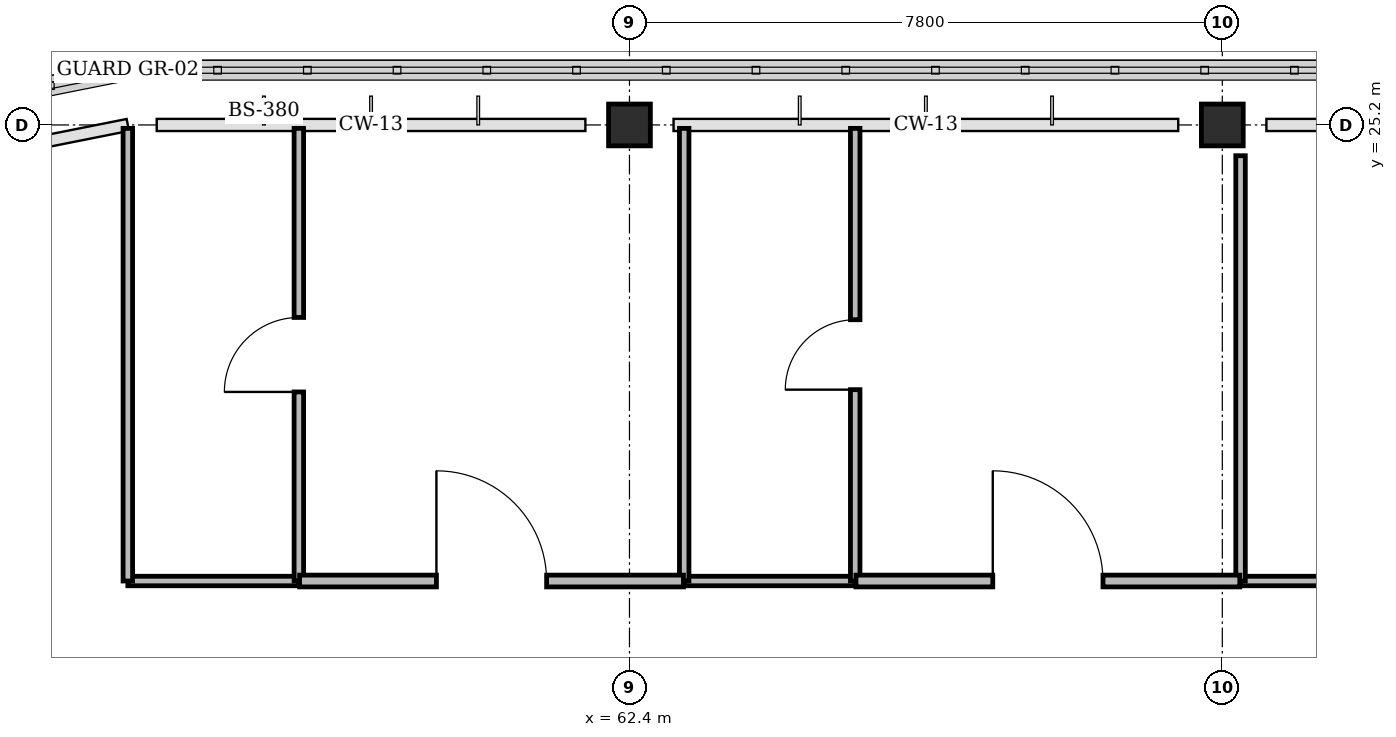
"""IFC4 building model, lengths in metres.
Left out: names, types, materials, properties, quantities, classifications, styles, units other than length and angle.
Written with IfcOpenShell. Run it as: python <this file> out.ifc"""

import sys

from ifc_helpers import new_model, si_unit, direction, frame, frame_2d, origin, origin_2d, place, context, subcontext, project, spatial, rectangle, extrude, element, fill, save


model = new_model("IFC4")
c1 = context("Model", 3, precision=1e-05, world=origin(), true_north=direction((0.0, 1.0)))
c2 = subcontext(c1, "Body", "Model", "MODEL_VIEW")
j1 = project(units=[si_unit("LENGTHUNIT", "METRE"), si_unit("PLANEANGLEUNIT", "RADIAN")], contexts=[c1])
p1 = place(None, origin())
s1 = spatial("IfcSite", under=j1, at=p1, CompositionType="ELEMENT")
p2 = place(p1, origin())
s2 = spatial("IfcBuilding", under=s1, at=p2, CompositionType="ELEMENT")
p3 = place(p2, frame((0.0, 0.0, 39.0)))
s3 = spatial("IfcBuildingStorey", under=s2, at=p3, CompositionType="ELEMENT", Elevation=39.0)
for number, where, z_axis, x_axis in (
    (1, (62.4, 25.2, 0.0), (0.0, 0.0, 1.0), (1.0, 0.0, 0.0)),
    (2, (70.2, 25.2, 0.0), (0.0, 0.0, 1.0), (1.0, 0.0, 0.0)),
):
    element("IfcColumn", number, at=place(p3, frame(where, z_axis=z_axis, x_axis=x_axis)), inside=s3, PredefinedType="COLUMN", context=c2, shape_type="SweptSolid", body=[
        extrude(rectangle(XDim=0.55, YDim=0.55, at=origin_2d()), origin(), (0.0, 0.0, 1.0), 4.2),
    ])
p4 = place(p3, frame((55.8, 19.2, 0.0), z_axis=(0.0, 0.0, 1.0), x_axis=(1.0, 0.0, 0.0)))
e3 = element("IfcWall", 3, at=p4, inside=s3, PredefinedType="PARTITIONING", context=c2, shape_type="SweptSolid", body=[
    extrude(rectangle(XDim=2.25, YDim=0.125, at=frame_2d((1.125, 0.0))), origin(), (0.0, 0.0, 1.0), 3.9),
])
p5 = place(p3, frame((55.8, 19.2, 0.0), z_axis=(0.0, 0.0, 1.0), x_axis=(0.0, 1.0, 0.0)))
e4 = element("IfcWall", 4, at=p5, inside=s3, PredefinedType="PARTITIONING", context=c2, shape_type="SweptSolid", body=[
    extrude(rectangle(XDim=5.955, YDim=0.125, at=frame_2d((2.978, 0.0))), origin(), (0.0, 0.0, 1.0), 3.9),
])
p6 = place(p3, frame((58.05, 19.2, 0.0), z_axis=(0.0, 0.0, 1.0), x_axis=(0.0, 1.0, 0.0)))
e5 = element("IfcWall", 5, at=p6, inside=s3, PredefinedType="PARTITIONING", context=c2, shape_type="SweptSolid", body=[
    extrude(rectangle(XDim=5.955, YDim=0.125, at=frame_2d((2.978, 0.0))), origin(), (0.0, 0.0, 1.0), 3.9),
])
p7 = place(p6, frame((2.488, 0.0, 0.0)))
e6 = element("IfcOpeningElement", 6, at=p7, cuts=e5, PredefinedType="OPENING", context=c2, shape_type="SweptSolid", body=[
    extrude(rectangle(XDim=0.98, YDim=2.1, at=frame_2d((0.49, 1.05))), frame((0.0, 0.073, 0.0), z_axis=(0.0, -1.0, 0.0), x_axis=(1.0, 0.0, 0.0)), (0.0, 0.0, 1.0), 0.145),
])
p8 = place(p3, frame((63.12, 19.2, 0.0), z_axis=(0.0, 0.0, 1.0), x_axis=(1.0, 0.0, 0.0)))
e7 = element("IfcWall", 7, at=p8, inside=s3, PredefinedType="PARTITIONING", context=c2, shape_type="SweptSolid", body=[
    extrude(rectangle(XDim=2.25, YDim=0.125, at=frame_2d((1.125, 0.0))), origin(), (0.0, 0.0, 1.0), 3.9),
])
p9 = place(p3, frame((63.12, 19.2, 0.0), z_axis=(0.0, 0.0, 1.0), x_axis=(0.0, 1.0, 0.0)))
e8 = element("IfcWall", 8, at=p9, inside=s3, PredefinedType="PARTITIONING", context=c2, shape_type="SweptSolid", body=[
    extrude(rectangle(XDim=5.955, YDim=0.125, at=frame_2d((2.978, 0.0))), origin(), (0.0, 0.0, 1.0), 3.9),
])
p10 = place(p3, frame((65.37, 19.2, 0.0), z_axis=(0.0, 0.0, 1.0), x_axis=(0.0, 1.0, 0.0)))
e9 = element("IfcWall", 9, at=p10, inside=s3, PredefinedType="PARTITIONING", context=c2, shape_type="SweptSolid", body=[
    extrude(rectangle(XDim=5.955, YDim=0.125, at=frame_2d((2.978, 0.0))), origin(), (0.0, 0.0, 1.0), 3.9),
])
p11 = place(p10, frame((2.518, 0.0, 0.0)))
e10 = element("IfcOpeningElement", 10, at=p11, cuts=e9, PredefinedType="OPENING", context=c2, shape_type="SweptSolid", body=[
    extrude(rectangle(XDim=0.92, YDim=2.1, at=frame_2d((0.46, 1.05))), frame((0.0, 0.073, 0.0), z_axis=(0.0, -1.0, 0.0), x_axis=(1.0, 0.0, 0.0)), (0.0, 0.0, 1.0), 0.145),
])
p12 = place(p3, frame((70.44, 19.2, 0.0), z_axis=(0.0, 0.0, 1.0), x_axis=(1.0, 0.0, 0.0)))
e11 = element("IfcWall", 11, at=p12, inside=s3, PredefinedType="PARTITIONING", context=c2, shape_type="SweptSolid", body=[
    extrude(rectangle(XDim=2.25, YDim=0.125, at=frame_2d((1.125, 0.0))), origin(), (0.0, 0.0, 1.0), 3.9),
])
p13 = place(p3, frame((70.44, 19.2, 0.0), z_axis=(0.0, 0.0, 1.0), x_axis=(0.0, 1.0, 0.0)))
e12 = element("IfcWall", 12, at=p13, inside=s3, PredefinedType="PARTITIONING", context=c2, shape_type="SweptSolid", body=[
    extrude(rectangle(XDim=5.595, YDim=0.125, at=frame_2d((2.797, 0.0))), origin(), (0.0, 0.0, 1.0), 3.355),
])
p14 = place(p3, frame((58.06, 19.2, 0.0), z_axis=(0.0, 0.0, 1.0), x_axis=(1.0, 0.0, 0.0)))
e13 = element("IfcWall", 13, at=p14, inside=s3, PredefinedType="PARTITIONING", context=c2, shape_type="SweptSolid", body=[
    extrude(rectangle(XDim=5.05, YDim=0.155, at=frame_2d((2.525, 0.0))), origin(), (0.0, 0.0, 1.0), 3.9),
])
p15 = place(p14, frame((1.8, 0.0, 0.0)))
e14 = element("IfcOpeningElement", 14, at=p15, cuts=e13, PredefinedType="OPENING", context=c2, shape_type="SweptSolid", body=[
    extrude(rectangle(XDim=1.45, YDim=2.2, at=frame_2d((0.725, 1.1))), frame((0.0, 0.087, 0.0), z_axis=(0.0, -1.0, 0.0), x_axis=(1.0, 0.0, 0.0)), (0.0, 0.0, 1.0), 0.175),
])
p16 = place(p3, frame((65.38, 19.2, 0.0), z_axis=(0.0, 0.0, 1.0), x_axis=(1.0, 0.0, 0.0)))
e15 = element("IfcWall", 15, at=p16, inside=s3, PredefinedType="PARTITIONING", context=c2, shape_type="SweptSolid", body=[
    extrude(rectangle(XDim=5.05, YDim=0.155, at=frame_2d((2.525, 0.0))), origin(), (0.0, 0.0, 1.0), 3.9),
])
p17 = place(p16, frame((1.8, 0.0, 0.0)))
e16 = element("IfcOpeningElement", 16, at=p17, cuts=e15, PredefinedType="OPENING", context=c2, shape_type="SweptSolid", body=[
    extrude(rectangle(XDim=1.45, YDim=2.2, at=frame_2d((0.725, 1.1))), frame((0.0, 0.087, 0.0), z_axis=(0.0, -1.0, 0.0), x_axis=(1.0, 0.0, 0.0)), (0.0, 0.0, 1.0), 0.175),
])
p18 = place(p7, origin())
e17 = element("IfcDoor", 17, at=p18, inside=s3, OperationType="SINGLE_SWING_LEFT", PredefinedType="DOOR", context=c2, shape_type="SweptSolid", body=[
    extrude(rectangle(XDim=0.98, YDim=2.1, at=frame_2d((0.49, 1.05))), frame((0.0, 0.025, 0.0), z_axis=(0.0, -1.0, 0.0), x_axis=(1.0, 0.0, 0.0)), (0.0, 0.0, 1.0), 0.05),
])
fill(e6, e17)
p19 = place(p11, origin())
e18 = element("IfcDoor", 18, at=p19, inside=s3, OperationType="SINGLE_SWING_LEFT", PredefinedType="DOOR", context=c2, shape_type="SweptSolid", body=[
    extrude(rectangle(XDim=0.92, YDim=2.1, at=frame_2d((0.46, 1.05))), frame((0.0, 0.025, 0.0), z_axis=(0.0, -1.0, 0.0), x_axis=(1.0, 0.0, 0.0)), (0.0, 0.0, 1.0), 0.05),
])
fill(e10, e18)
p20 = place(p15, origin())
e19 = element("IfcDoor", 19, at=p20, inside=s3, OperationType="SINGLE_SWING_LEFT", PredefinedType="DOOR", context=c2, shape_type="SweptSolid", body=[
    extrude(rectangle(XDim=1.45, YDim=2.2, at=frame_2d((0.725, 1.1))), frame((0.0, 0.025, 0.0), z_axis=(0.0, -1.0, 0.0), x_axis=(1.0, 0.0, 0.0)), (0.0, 0.0, 1.0), 0.05),
])
fill(e14, e19)
p21 = place(p17, origin())
e20 = element("IfcDoor", 20, at=p21, inside=s3, OperationType="SINGLE_SWING_LEFT", PredefinedType="DOOR", context=c2, shape_type="SweptSolid", body=[
    extrude(rectangle(XDim=1.45, YDim=2.2, at=frame_2d((0.725, 1.1))), frame((0.0, 0.025, 0.0), z_axis=(0.0, -1.0, 0.0), x_axis=(1.0, 0.0, 0.0)), (0.0, 0.0, 1.0), 0.05),
])
fill(e16, e20)
save(model, sys.argv[1])
